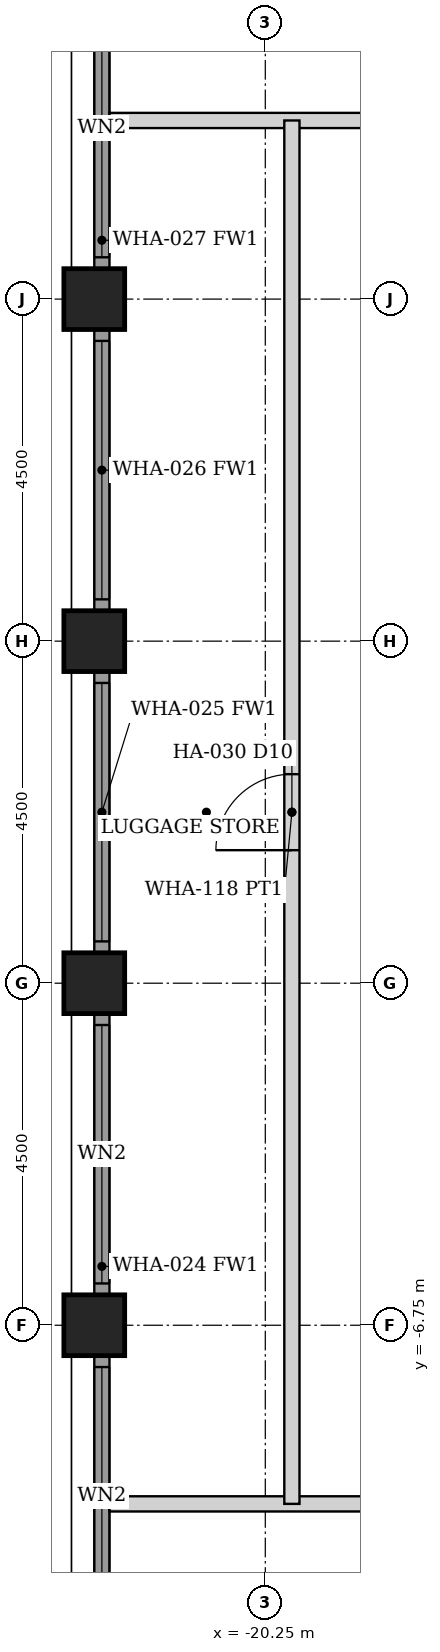
"""IFC4 building model, lengths in metres.
Left out: names, types, materials, properties, quantities, classifications, styles, units other than length and angle.
Written with IfcOpenShell. Run it as: python <this file> out.ifc"""

import sys

from ifc_helpers import new_model, si_unit, direction, frame, frame_2d, origin, origin_2d, place, context, subcontext, project, spatial, rectangle, hollow_rectangle, extrude, element, fill, save


model = new_model("IFC4")
c1 = context("Model", 3, precision=1e-05, world=origin(), true_north=direction((0.0, 1.0)))
c2 = subcontext(c1, "Body", "Model", "MODEL_VIEW")
j1 = project(units=[si_unit("LENGTHUNIT", "METRE"), si_unit("PLANEANGLEUNIT", "RADIAN")], contexts=[c1])
p1 = place(None, origin())
s1 = spatial("IfcSite", under=j1, at=p1, CompositionType="ELEMENT")
p2 = place(p1, origin())
s2 = spatial("IfcBuilding", under=s1, at=p2, CompositionType="ELEMENT")
p3 = place(p2, frame((0.0, 0.0, 118.4)))
s3 = spatial("IfcBuildingStorey", under=s2, at=p3, CompositionType="ELEMENT", Elevation=118.4)
for number, where, z_axis, x_axis in (
    (1, (-22.5, -6.75, 0.0), (0.0, 0.0, 1.0), (1.0, 0.0, 0.0)),
    (2, (-22.5, -2.25, 0.0), (0.0, 0.0, 1.0), (1.0, 0.0, 0.0)),
    (3, (-22.5, 2.25, 0.0), (0.0, 0.0, 1.0), (1.0, 0.0, 0.0)),
    (4, (-22.5, 6.75, 0.0), (0.0, 0.0, 1.0), (1.0, 0.0, 0.0)),
):
    element("IfcColumn", number, at=place(p3, frame(where, z_axis=z_axis, x_axis=x_axis)), inside=s3, PredefinedType="COLUMN", context=c2, shape_type="SweptSolid", body=[
        extrude(hollow_rectangle(XDim=0.8, YDim=0.8, WallThickness=0.06, at=origin_2d()), origin(), (0.0, 0.0, 1.0), 3.6),
    ])
p4 = place(p3, frame((-22.4, -10.845, 0.0), z_axis=(0.0, 0.0, 1.0), x_axis=(0.0, 1.0, 0.0)))
e5 = element("IfcWall", 5, at=p4, inside=s3, PredefinedType="SOLIDWALL", context=c2, shape_type="SweptSolid", body=[
    extrude(rectangle(XDim=3.69, YDim=0.2, at=frame_2d((1.845, 0.0))), origin(), (0.0, 0.0, 1.0), 2.479),
])
p5 = place(p4, frame((0.145, 0.0, 0.3)))
e6 = element("IfcOpeningElement", 6, at=p5, cuts=e5, PredefinedType="OPENING", context=c2, shape_type="SweptSolid", body=[
    extrude(rectangle(XDim=3.4, YDim=2.029, at=frame_2d((1.7, 1.015))), frame((0.0, 0.11, 0.0), z_axis=(0.0, -1.0, 0.0), x_axis=(1.0, 0.0, 0.0)), (0.0, 0.0, 1.0), 0.22),
])
p6 = place(p3, frame((-22.4, -6.345, 0.0), z_axis=(0.0, 0.0, 1.0), x_axis=(0.0, 1.0, 0.0)))
e7 = element("IfcWall", 7, at=p6, inside=s3, PredefinedType="SOLIDWALL", context=c2, shape_type="SweptSolid", body=[
    extrude(rectangle(XDim=3.69, YDim=0.2, at=frame_2d((1.845, 0.0))), origin(), (0.0, 0.0, 1.0), 2.479),
])
p7 = place(p6, frame((0.145, 0.0, 0.3)))
e8 = element("IfcOpeningElement", 8, at=p7, cuts=e7, PredefinedType="OPENING", context=c2, shape_type="SweptSolid", body=[
    extrude(rectangle(XDim=3.4, YDim=2.029, at=frame_2d((1.7, 1.015))), frame((0.0, 0.11, 0.0), z_axis=(0.0, -1.0, 0.0), x_axis=(1.0, 0.0, 0.0)), (0.0, 0.0, 1.0), 0.22),
])
p8 = place(p3, frame((-22.4, -1.845, 0.0), z_axis=(0.0, 0.0, 1.0), x_axis=(0.0, 1.0, 0.0)))
e9 = element("IfcWall", 9, at=p8, inside=s3, PredefinedType="SOLIDWALL", context=c2, shape_type="SweptSolid", body=[
    extrude(rectangle(XDim=3.69, YDim=0.2, at=frame_2d((1.845, 0.0))), origin(), (0.0, 0.0, 1.0), 2.479),
])
p9 = place(p8, frame((0.145, 0.0, 0.3)))
e10 = element("IfcOpeningElement", 10, at=p9, cuts=e9, PredefinedType="OPENING", context=c2, shape_type="SweptSolid", body=[
    extrude(rectangle(XDim=3.4, YDim=2.029, at=frame_2d((1.7, 1.015))), frame((0.0, 0.11, 0.0), z_axis=(0.0, -1.0, 0.0), x_axis=(1.0, 0.0, 0.0)), (0.0, 0.0, 1.0), 0.22),
])
p10 = place(p3, frame((-22.4, 2.655, 0.0), z_axis=(0.0, 0.0, 1.0), x_axis=(0.0, 1.0, 0.0)))
e11 = element("IfcWall", 11, at=p10, inside=s3, PredefinedType="SOLIDWALL", context=c2, shape_type="SweptSolid", body=[
    extrude(rectangle(XDim=3.69, YDim=0.2, at=frame_2d((1.845, 0.0))), origin(), (0.0, 0.0, 1.0), 2.479),
])
p11 = place(p10, frame((0.145, 0.0, 0.3)))
e12 = element("IfcOpeningElement", 12, at=p11, cuts=e11, PredefinedType="OPENING", context=c2, shape_type="SweptSolid", body=[
    extrude(rectangle(XDim=3.4, YDim=2.029, at=frame_2d((1.7, 1.015))), frame((0.0, 0.11, 0.0), z_axis=(0.0, -1.0, 0.0), x_axis=(1.0, 0.0, 0.0)), (0.0, 0.0, 1.0), 0.22),
])
p12 = place(p3, frame((-22.4, 7.155, 0.0), z_axis=(0.0, 0.0, 1.0), x_axis=(0.0, 1.0, 0.0)))
e13 = element("IfcWall", 13, at=p12, inside=s3, PredefinedType="SOLIDWALL", context=c2, shape_type="SweptSolid", body=[
    extrude(rectangle(XDim=3.69, YDim=0.2, at=frame_2d((1.845, 0.0))), origin(), (0.0, 0.0, 1.0), 2.479),
])
p13 = place(p12, frame((0.145, 0.0, 0.3)))
e14 = element("IfcOpeningElement", 14, at=p13, cuts=e13, PredefinedType="OPENING", context=c2, shape_type="SweptSolid", body=[
    extrude(rectangle(XDim=3.4, YDim=2.029, at=frame_2d((1.7, 1.015))), frame((0.0, 0.11, 0.0), z_axis=(0.0, -1.0, 0.0), x_axis=(1.0, 0.0, 0.0)), (0.0, 0.0, 1.0), 0.22),
])
p14 = place(p3, frame((-22.3, 9.1, 0.0), z_axis=(0.0, 0.0, 1.0), x_axis=(1.0, 0.0, 0.0)))
e15 = element("IfcWall", 15, at=p14, inside=s3, PredefinedType="PARTITIONING", context=c2, shape_type="SweptSolid", body=[
    extrude(rectangle(XDim=44.6, YDim=0.2, at=frame_2d((22.3, 0.0))), origin(), (0.0, 0.0, 1.0), 2.473),
])
p15 = place(p14, frame((6.75, 0.0, 0.0)))
e16 = element("IfcOpeningElement", 16, at=p15, cuts=e15, PredefinedType="OPENING", context=c2, shape_type="SweptSolid", body=[
    extrude(rectangle(XDim=0.9, YDim=2.1, at=frame_2d((0.45, 1.05))), frame((0.0, 0.11, 0.0), z_axis=(0.0, -1.0, 0.0), x_axis=(1.0, 0.0, 0.0)), (0.0, 0.0, 1.0), 0.22),
])
p16 = place(p14, frame((11.25, 0.0, 0.0)))
e17 = element("IfcOpeningElement", 17, at=p16, cuts=e15, PredefinedType="OPENING", context=c2, shape_type="SweptSolid", body=[
    extrude(rectangle(XDim=0.9, YDim=2.1, at=frame_2d((0.45, 1.05))), frame((0.0, 0.11, 0.0), z_axis=(0.0, -1.0, 0.0), x_axis=(1.0, 0.0, 0.0)), (0.0, 0.0, 1.0), 0.22),
])
p17 = place(p14, frame((15.75, 0.0, 0.0)))
e18 = element("IfcOpeningElement", 18, at=p17, cuts=e15, PredefinedType="OPENING", context=c2, shape_type="SweptSolid", body=[
    extrude(rectangle(XDim=0.9, YDim=2.1, at=frame_2d((0.45, 1.05))), frame((0.0, 0.11, 0.0), z_axis=(0.0, -1.0, 0.0), x_axis=(1.0, 0.0, 0.0)), (0.0, 0.0, 1.0), 0.22),
])
p18 = place(p14, frame((20.25, 0.0, 0.0)))
e19 = element("IfcOpeningElement", 19, at=p18, cuts=e15, PredefinedType="OPENING", context=c2, shape_type="SweptSolid", body=[
    extrude(rectangle(XDim=0.9, YDim=2.1, at=frame_2d((0.45, 1.05))), frame((0.0, 0.11, 0.0), z_axis=(0.0, -1.0, 0.0), x_axis=(1.0, 0.0, 0.0)), (0.0, 0.0, 1.0), 0.22),
])
p19 = place(p14, frame((24.75, 0.0, 0.0)))
e20 = element("IfcOpeningElement", 20, at=p19, cuts=e15, PredefinedType="OPENING", context=c2, shape_type="SweptSolid", body=[
    extrude(rectangle(XDim=0.9, YDim=2.1, at=frame_2d((0.45, 1.05))), frame((0.0, 0.11, 0.0), z_axis=(0.0, -1.0, 0.0), x_axis=(1.0, 0.0, 0.0)), (0.0, 0.0, 1.0), 0.22),
])
p20 = place(p14, frame((29.25, 0.0, 0.0)))
e21 = element("IfcOpeningElement", 21, at=p20, cuts=e15, PredefinedType="OPENING", context=c2, shape_type="SweptSolid", body=[
    extrude(rectangle(XDim=0.9, YDim=2.1, at=frame_2d((0.45, 1.05))), frame((0.0, 0.11, 0.0), z_axis=(0.0, -1.0, 0.0), x_axis=(1.0, 0.0, 0.0)), (0.0, 0.0, 1.0), 0.22),
])
p21 = place(p14, frame((33.75, 0.0, 0.0)))
e22 = element("IfcOpeningElement", 22, at=p21, cuts=e15, PredefinedType="OPENING", context=c2, shape_type="SweptSolid", body=[
    extrude(rectangle(XDim=0.9, YDim=2.1, at=frame_2d((0.45, 1.05))), frame((0.0, 0.11, 0.0), z_axis=(0.0, -1.0, 0.0), x_axis=(1.0, 0.0, 0.0)), (0.0, 0.0, 1.0), 0.22),
])
p22 = place(p14, frame((38.85, 0.0, 0.0)))
e23 = element("IfcOpeningElement", 23, at=p22, cuts=e15, PredefinedType="OPENING", context=c2, shape_type="SweptSolid", body=[
    extrude(rectangle(XDim=0.9, YDim=2.1, at=frame_2d((0.45, 1.05))), frame((0.0, 0.11, 0.0), z_axis=(0.0, -1.0, 0.0), x_axis=(1.0, 0.0, 0.0)), (0.0, 0.0, 1.0), 0.22),
])
p23 = place(p14, frame((4.85, 0.0, 0.0)))
e24 = element("IfcOpeningElement", 24, at=p23, cuts=e15, PredefinedType="OPENING", context=c2, shape_type="SweptSolid", body=[
    extrude(rectangle(XDim=0.9, YDim=2.1, at=frame_2d((0.45, 1.05))), frame((0.0, 0.11, 0.0), z_axis=(0.0, -1.0, 0.0), x_axis=(1.0, 0.0, 0.0)), (0.0, 0.0, 1.0), 0.22),
])
p24 = place(p3, frame((-22.3, -9.1, 0.0), z_axis=(0.0, 0.0, 1.0), x_axis=(1.0, 0.0, 0.0)))
e25 = element("IfcWall", 25, at=p24, inside=s3, PredefinedType="PARTITIONING", context=c2, shape_type="SweptSolid", body=[
    extrude(rectangle(XDim=44.6, YDim=0.2, at=frame_2d((22.3, 0.0))), origin(), (0.0, 0.0, 1.0), 2.473),
])
p25 = place(p24, frame((6.75, 0.0, 0.0)))
e26 = element("IfcOpeningElement", 26, at=p25, cuts=e25, PredefinedType="OPENING", context=c2, shape_type="SweptSolid", body=[
    extrude(rectangle(XDim=0.9, YDim=2.1, at=frame_2d((0.45, 1.05))), frame((0.0, 0.11, 0.0), z_axis=(0.0, -1.0, 0.0), x_axis=(1.0, 0.0, 0.0)), (0.0, 0.0, 1.0), 0.22),
])
p26 = place(p24, frame((11.25, 0.0, 0.0)))
e27 = element("IfcOpeningElement", 27, at=p26, cuts=e25, PredefinedType="OPENING", context=c2, shape_type="SweptSolid", body=[
    extrude(rectangle(XDim=0.9, YDim=2.1, at=frame_2d((0.45, 1.05))), frame((0.0, 0.11, 0.0), z_axis=(0.0, -1.0, 0.0), x_axis=(1.0, 0.0, 0.0)), (0.0, 0.0, 1.0), 0.22),
])
p27 = place(p24, frame((15.75, 0.0, 0.0)))
e28 = element("IfcOpeningElement", 28, at=p27, cuts=e25, PredefinedType="OPENING", context=c2, shape_type="SweptSolid", body=[
    extrude(rectangle(XDim=0.9, YDim=2.1, at=frame_2d((0.45, 1.05))), frame((0.0, 0.11, 0.0), z_axis=(0.0, -1.0, 0.0), x_axis=(1.0, 0.0, 0.0)), (0.0, 0.0, 1.0), 0.22),
])
p28 = place(p24, frame((20.25, 0.0, 0.0)))
e29 = element("IfcOpeningElement", 29, at=p28, cuts=e25, PredefinedType="OPENING", context=c2, shape_type="SweptSolid", body=[
    extrude(rectangle(XDim=0.9, YDim=2.1, at=frame_2d((0.45, 1.05))), frame((0.0, 0.11, 0.0), z_axis=(0.0, -1.0, 0.0), x_axis=(1.0, 0.0, 0.0)), (0.0, 0.0, 1.0), 0.22),
])
p29 = place(p24, frame((24.75, 0.0, 0.0)))
e30 = element("IfcOpeningElement", 30, at=p29, cuts=e25, PredefinedType="OPENING", context=c2, shape_type="SweptSolid", body=[
    extrude(rectangle(XDim=0.9, YDim=2.1, at=frame_2d((0.45, 1.05))), frame((0.0, 0.11, 0.0), z_axis=(0.0, -1.0, 0.0), x_axis=(1.0, 0.0, 0.0)), (0.0, 0.0, 1.0), 0.22),
])
p30 = place(p24, frame((29.25, 0.0, 0.0)))
e31 = element("IfcOpeningElement", 31, at=p30, cuts=e25, PredefinedType="OPENING", context=c2, shape_type="SweptSolid", body=[
    extrude(rectangle(XDim=0.9, YDim=2.1, at=frame_2d((0.45, 1.05))), frame((0.0, 0.11, 0.0), z_axis=(0.0, -1.0, 0.0), x_axis=(1.0, 0.0, 0.0)), (0.0, 0.0, 1.0), 0.22),
])
p31 = place(p24, frame((33.75, 0.0, 0.0)))
e32 = element("IfcOpeningElement", 32, at=p31, cuts=e25, PredefinedType="OPENING", context=c2, shape_type="SweptSolid", body=[
    extrude(rectangle(XDim=0.9, YDim=2.1, at=frame_2d((0.45, 1.05))), frame((0.0, 0.11, 0.0), z_axis=(0.0, -1.0, 0.0), x_axis=(1.0, 0.0, 0.0)), (0.0, 0.0, 1.0), 0.22),
])
p32 = place(p24, frame((38.85, 0.0, 0.0)))
e33 = element("IfcOpeningElement", 33, at=p32, cuts=e25, PredefinedType="OPENING", context=c2, shape_type="SweptSolid", body=[
    extrude(rectangle(XDim=0.9, YDim=2.1, at=frame_2d((0.45, 1.05))), frame((0.0, 0.11, 0.0), z_axis=(0.0, -1.0, 0.0), x_axis=(1.0, 0.0, 0.0)), (0.0, 0.0, 1.0), 0.22),
])
p33 = place(p24, frame((4.85, 0.0, 0.0)))
e34 = element("IfcOpeningElement", 34, at=p33, cuts=e25, PredefinedType="OPENING", context=c2, shape_type="SweptSolid", body=[
    extrude(rectangle(XDim=0.9, YDim=2.1, at=frame_2d((0.45, 1.05))), frame((0.0, 0.11, 0.0), z_axis=(0.0, -1.0, 0.0), x_axis=(1.0, 0.0, 0.0)), (0.0, 0.0, 1.0), 0.22),
])
p34 = place(p3, frame((-19.9, -9.1, 0.0), z_axis=(0.0, 0.0, 1.0), x_axis=(0.0, 1.0, 0.0)))
e35 = element("IfcWall", 35, at=p34, inside=s3, PredefinedType="PARTITIONING", context=c2, shape_type="SweptSolid", body=[
    extrude(rectangle(XDim=18.2, YDim=0.2, at=frame_2d((9.1, 0.0))), origin(), (0.0, 0.0, 1.0), 2.473),
])
p35 = place(p34, frame((8.6, 0.0, 0.0)))
e36 = element("IfcOpeningElement", 36, at=p35, cuts=e35, PredefinedType="OPENING", context=c2, shape_type="SweptSolid", body=[
    extrude(rectangle(XDim=1.0, YDim=2.1, at=frame_2d((0.5, 1.05))), frame((0.0, 0.11, 0.0), z_axis=(0.0, -1.0, 0.0), x_axis=(1.0, 0.0, 0.0)), (0.0, 0.0, 1.0), 0.22),
])
p36 = place(p5, origin())
e37 = element("IfcWindow", 37, at=p36, inside=s3, PartitioningType="SINGLE_PANEL", PredefinedType="WINDOW", context=c2, shape_type="SweptSolid", body=[
    extrude(rectangle(XDim=3.4, YDim=2.029, at=frame_2d((1.7, 1.015))), frame((0.0, 0.03, 0.0), z_axis=(0.0, -1.0, 0.0), x_axis=(1.0, 0.0, 0.0)), (0.0, 0.0, 1.0), 0.06),
])
fill(e6, e37)
p37 = place(p7, origin())
e38 = element("IfcWindow", 38, at=p37, inside=s3, PartitioningType="SINGLE_PANEL", PredefinedType="WINDOW", context=c2, shape_type="SweptSolid", body=[
    extrude(rectangle(XDim=3.4, YDim=2.029, at=frame_2d((1.7, 1.015))), frame((0.0, 0.03, 0.0), z_axis=(0.0, -1.0, 0.0), x_axis=(1.0, 0.0, 0.0)), (0.0, 0.0, 1.0), 0.06),
])
fill(e8, e38)
p38 = place(p9, origin())
e39 = element("IfcWindow", 39, at=p38, inside=s3, PartitioningType="SINGLE_PANEL", PredefinedType="WINDOW", context=c2, shape_type="SweptSolid", body=[
    extrude(rectangle(XDim=3.4, YDim=2.029, at=frame_2d((1.7, 1.015))), frame((0.0, 0.03, 0.0), z_axis=(0.0, -1.0, 0.0), x_axis=(1.0, 0.0, 0.0)), (0.0, 0.0, 1.0), 0.06),
])
fill(e10, e39)
p39 = place(p11, origin())
e40 = element("IfcWindow", 40, at=p39, inside=s3, PartitioningType="SINGLE_PANEL", PredefinedType="WINDOW", context=c2, shape_type="SweptSolid", body=[
    extrude(rectangle(XDim=3.4, YDim=2.029, at=frame_2d((1.7, 1.015))), frame((0.0, 0.03, 0.0), z_axis=(0.0, -1.0, 0.0), x_axis=(1.0, 0.0, 0.0)), (0.0, 0.0, 1.0), 0.06),
])
fill(e12, e40)
p40 = place(p13, origin())
e41 = element("IfcWindow", 41, at=p40, inside=s3, PartitioningType="SINGLE_PANEL", PredefinedType="WINDOW", context=c2, shape_type="SweptSolid", body=[
    extrude(rectangle(XDim=3.4, YDim=2.029, at=frame_2d((1.7, 1.015))), frame((0.0, 0.03, 0.0), z_axis=(0.0, -1.0, 0.0), x_axis=(1.0, 0.0, 0.0)), (0.0, 0.0, 1.0), 0.06),
])
fill(e14, e41)
p41 = place(p35, origin())
e42 = element("IfcDoor", 42, at=p41, inside=s3, OperationType="SINGLE_SWING_LEFT", PredefinedType="DOOR", context=c2, shape_type="SweptSolid", body=[
    extrude(rectangle(XDim=1.0, YDim=2.1, at=frame_2d((0.5, 1.05))), frame((0.0, 0.025, 0.0), z_axis=(0.0, -1.0, 0.0), x_axis=(1.0, 0.0, 0.0)), (0.0, 0.0, 1.0), 0.05),
])
fill(e36, e42)
save(model, sys.argv[1])
